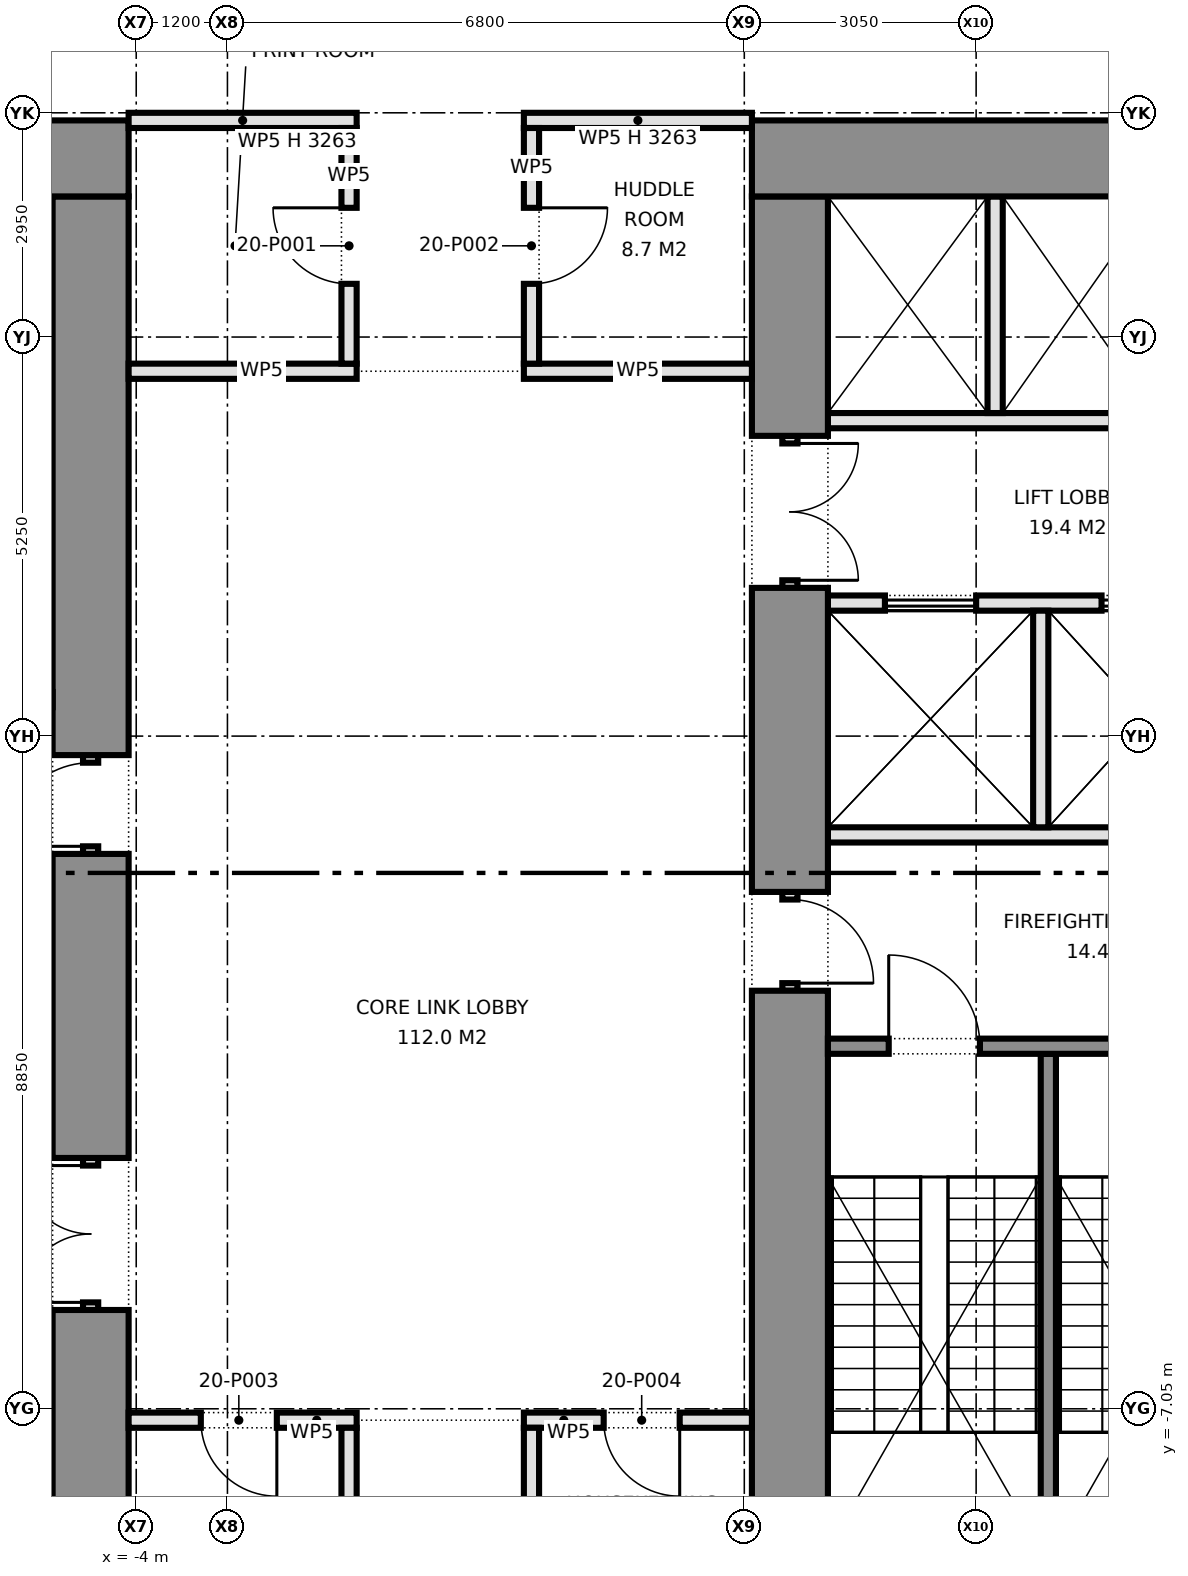
"""IFC4 building model, lengths in metres.
Left out: names, types, materials, properties, quantities, classifications, styles, units other than length and angle.
Written with IfcOpenShell. Run it as: python <this file> out.ifc"""

import sys

from ifc_helpers import new_model, si_unit, direction, frame, frame_2d, origin, place, context, subcontext, project, spatial, rectangle, extrude, element, fill, save


model = new_model("IFC4")
c1 = context("Model", 3, precision=1e-05, world=origin(), true_north=direction((0.0, 1.0)))
c2 = subcontext(c1, "Body", "Model", "MODEL_VIEW")
j1 = project(units=[si_unit("LENGTHUNIT", "METRE"), si_unit("PLANEANGLEUNIT", "RADIAN")], contexts=[c1])
p1 = place(None, origin())
s1 = spatial("IfcSite", under=j1, at=p1, CompositionType="ELEMENT")
p2 = place(p1, origin())
s2 = spatial("IfcBuilding", under=s1, at=p2, CompositionType="ELEMENT")
p3 = place(p2, frame((0.0, 0.0, 90.8)))
s3 = spatial("IfcBuildingStorey", under=s2, at=p3, CompositionType="ELEMENT", Elevation=90.8)
p4 = place(p3, frame((-14.9, 9.4, 0.0), z_axis=(0.0, 0.0, 1.0), x_axis=(1.0, 0.0, 0.0)))
e1 = element("IfcWall", 1, at=p4, inside=s3, PredefinedType="SHEAR", context=c2, shape_type="SweptSolid", body=[
    extrude(rectangle(XDim=10.8, YDim=1.0, at=frame_2d((5.4, 0.0))), origin(), (0.0, 0.0, 1.0), 4.2),
])
p5 = place(p3, frame((-4.6, -8.9, 0.0), z_axis=(0.0, 0.0, 1.0), x_axis=(0.0, 1.0, 0.0)))
e2 = element("IfcWall", 2, at=p5, inside=s3, PredefinedType="SHEAR", context=c2, shape_type="SweptSolid", body=[
    extrude(rectangle(XDim=3.15, YDim=1.0, at=frame_2d((1.575, 0.0))), origin(), (0.0, 0.0, 1.0), 4.2),
])
p6 = place(p3, frame((-4.6, -5.75, 0.0), z_axis=(0.0, 0.0, 1.0), x_axis=(0.0, 1.0, 0.0)))
e3 = element("IfcWall", 3, at=p6, inside=s3, PredefinedType="PARTITIONING", context=c2, shape_type="SweptSolid", body=[
    extrude(rectangle(XDim=2.0, YDim=0.2, at=frame_2d((1.0, 0.0))), origin(), (0.0, 0.0, 1.0), 2.4),
])
p7 = place(p6, frame((0.1, 0.0, 0.0)))
e4 = element("IfcOpeningElement", 4, at=p7, cuts=e3, PredefinedType="OPENING", context=c2, shape_type="SweptSolid", body=[
    extrude(rectangle(XDim=1.8, YDim=2.1, at=frame_2d((0.9, 1.05))), frame((0.0, 0.11, 0.0), z_axis=(0.0, -1.0, 0.0), x_axis=(1.0, 0.0, 0.0)), (0.0, 0.0, 1.0), 0.22),
])
p8 = place(p3, frame((-4.6, -3.75, 0.0), z_axis=(0.0, 0.0, 1.0), x_axis=(0.0, 1.0, 0.0)))
e5 = element("IfcWall", 5, at=p8, inside=s3, PredefinedType="SHEAR", context=c2, shape_type="SweptSolid", body=[
    extrude(rectangle(XDim=4.0, YDim=1.0, at=frame_2d((2.0, 0.0))), origin(), (0.0, 0.0, 1.0), 4.2),
])
p9 = place(p3, frame((-4.6, 0.25, 0.0), z_axis=(0.0, 0.0, 1.0), x_axis=(0.0, 1.0, 0.0)))
e6 = element("IfcWall", 6, at=p9, inside=s3, PredefinedType="PARTITIONING", context=c2, shape_type="SweptSolid", body=[
    extrude(rectangle(XDim=1.3, YDim=0.2, at=frame_2d((0.65, 0.0))), origin(), (0.0, 0.0, 1.0), 2.4),
])
p10 = place(p9, frame((0.1, 0.0, 0.0)))
e7 = element("IfcOpeningElement", 7, at=p10, cuts=e6, PredefinedType="OPENING", context=c2, shape_type="SweptSolid", body=[
    extrude(rectangle(XDim=1.1, YDim=2.1, at=frame_2d((0.55, 1.05))), frame((0.0, 0.11, 0.0), z_axis=(0.0, -1.0, 0.0), x_axis=(1.0, 0.0, 0.0)), (0.0, 0.0, 1.0), 0.22),
])
p11 = place(p3, frame((-4.6, 1.55, 0.0), z_axis=(0.0, 0.0, 1.0), x_axis=(0.0, 1.0, 0.0)))
e8 = element("IfcWall", 8, at=p11, inside=s3, PredefinedType="SHEAR", context=c2, shape_type="SweptSolid", body=[
    extrude(rectangle(XDim=7.35, YDim=1.0, at=frame_2d((3.675, 0.0))), origin(), (0.0, 0.0, 1.0), 4.2),
])
p12 = place(p3, frame((14.9, 9.4, 0.0), z_axis=(0.0, 0.0, 1.0), x_axis=(-1.0, 0.0, 0.0)))
e9 = element("IfcWall", 9, at=p12, inside=s3, PredefinedType="SHEAR", context=c2, shape_type="SweptSolid", body=[
    extrude(rectangle(XDim=10.8, YDim=1.0, at=frame_2d((5.4, 0.0))), origin(), (0.0, 0.0, 1.0), 4.2),
])
p13 = place(p3, frame((4.6, 8.9, 0.0), z_axis=(0.0, 0.0, 1.0), x_axis=(0.0, -1.0, 0.0)))
e10 = element("IfcWall", 10, at=p13, inside=s3, PredefinedType="SHEAR", context=c2, shape_type="SweptSolid", body=[
    extrude(rectangle(XDim=3.15, YDim=1.0, at=frame_2d((1.575, 0.0))), origin(), (0.0, 0.0, 1.0), 4.2),
])
p14 = place(p3, frame((4.6, 5.75, 0.0), z_axis=(0.0, 0.0, 1.0), x_axis=(0.0, -1.0, 0.0)))
e11 = element("IfcWall", 11, at=p14, inside=s3, PredefinedType="PARTITIONING", context=c2, shape_type="SweptSolid", body=[
    extrude(rectangle(XDim=2.0, YDim=0.2, at=frame_2d((1.0, 0.0))), origin(), (0.0, 0.0, 1.0), 2.4),
])
p15 = place(p14, frame((0.1, 0.0, 0.0)))
e12 = element("IfcOpeningElement", 12, at=p15, cuts=e11, PredefinedType="OPENING", context=c2, shape_type="SweptSolid", body=[
    extrude(rectangle(XDim=1.8, YDim=2.1, at=frame_2d((0.9, 1.05))), frame((0.0, 0.11, 0.0), z_axis=(0.0, -1.0, 0.0), x_axis=(1.0, 0.0, 0.0)), (0.0, 0.0, 1.0), 0.22),
])
p16 = place(p3, frame((4.6, 3.75, 0.0), z_axis=(0.0, 0.0, 1.0), x_axis=(0.0, -1.0, 0.0)))
e13 = element("IfcWall", 13, at=p16, inside=s3, PredefinedType="SHEAR", context=c2, shape_type="SweptSolid", body=[
    extrude(rectangle(XDim=4.0, YDim=1.0, at=frame_2d((2.0, 0.0))), origin(), (0.0, 0.0, 1.0), 4.2),
])
p17 = place(p3, frame((4.6, -0.25, 0.0), z_axis=(0.0, 0.0, 1.0), x_axis=(0.0, -1.0, 0.0)))
e14 = element("IfcWall", 14, at=p17, inside=s3, PredefinedType="PARTITIONING", context=c2, shape_type="SweptSolid", body=[
    extrude(rectangle(XDim=1.3, YDim=0.2, at=frame_2d((0.65, 0.0))), origin(), (0.0, 0.0, 1.0), 2.4),
])
p18 = place(p17, frame((0.1, 0.0, 0.0)))
e15 = element("IfcOpeningElement", 15, at=p18, cuts=e14, PredefinedType="OPENING", context=c2, shape_type="SweptSolid", body=[
    extrude(rectangle(XDim=1.1, YDim=2.1, at=frame_2d((0.55, 1.05))), frame((0.0, 0.11, 0.0), z_axis=(0.0, -1.0, 0.0), x_axis=(1.0, 0.0, 0.0)), (0.0, 0.0, 1.0), 0.22),
])
p19 = place(p3, frame((4.6, -1.55, 0.0), z_axis=(0.0, 0.0, 1.0), x_axis=(0.0, -1.0, 0.0)))
e16 = element("IfcWall", 16, at=p19, inside=s3, PredefinedType="SHEAR", context=c2, shape_type="SweptSolid", body=[
    extrude(rectangle(XDim=7.35, YDim=1.0, at=frame_2d((3.675, 0.0))), origin(), (0.0, 0.0, 1.0), 4.2),
])
p20 = place(p3, frame((13.9, 5.95, 0.0), z_axis=(0.0, 0.0, 1.0), x_axis=(-1.0, 0.0, 0.0)))
e17 = element("IfcWall", 17, at=p20, inside=s3, PredefinedType="PARTITIONING", context=c2, shape_type="SweptSolid", body=[
    extrude(rectangle(XDim=8.8, YDim=0.2, at=frame_2d((4.4, 0.0))), origin(), (0.0, 0.0, 1.0), 4.2),
])
p21 = place(p20, frame((1.7, 0.0, 0.0)))
e18 = element("IfcOpeningElement", 18, at=p21, cuts=e17, PredefinedType="OPENING", context=c2, shape_type="SweptSolid", body=[
    extrude(rectangle(XDim=0.9, YDim=2.1, at=frame_2d((0.45, 1.05))), frame((0.0, 0.11, 0.0), z_axis=(0.0, -1.0, 0.0), x_axis=(1.0, 0.0, 0.0)), (0.0, 0.0, 1.0), 0.22),
])
p22 = place(p3, frame((13.9, 3.55, 0.0), z_axis=(0.0, 0.0, 1.0), x_axis=(-1.0, 0.0, 0.0)))
e19 = element("IfcWall", 19, at=p22, inside=s3, PredefinedType="PARTITIONING", context=c2, shape_type="SweptSolid", body=[
    extrude(rectangle(XDim=8.8, YDim=0.2, at=frame_2d((4.4, 0.0))), origin(), (0.0, 0.0, 1.0), 4.2),
])
p23 = place(p22, frame((0.65, 0.0, 0.0)))
e20 = element("IfcOpeningElement", 20, at=p23, cuts=e19, PredefinedType="OPENING", context=c2, shape_type="SweptSolid", body=[
    extrude(rectangle(XDim=1.8, YDim=2.1, at=frame_2d((0.9, 1.05))), frame((0.0, 0.11, 0.0), z_axis=(0.0, -1.0, 0.0), x_axis=(1.0, 0.0, 0.0)), (0.0, 0.0, 1.0), 0.22),
])
p24 = place(p22, frame((4.0, 0.0, 0.0)))
e21 = element("IfcOpeningElement", 21, at=p24, cuts=e19, PredefinedType="OPENING", context=c2, shape_type="SweptSolid", body=[
    extrude(rectangle(XDim=1.2, YDim=2.1, at=frame_2d((0.6, 1.05))), frame((0.0, 0.11, 0.0), z_axis=(0.0, -1.0, 0.0), x_axis=(1.0, 0.0, 0.0)), (0.0, 0.0, 1.0), 0.22),
])
p25 = place(p22, frame((6.85, 0.0, 0.0)))
e22 = element("IfcOpeningElement", 22, at=p25, cuts=e19, PredefinedType="OPENING", context=c2, shape_type="SweptSolid", body=[
    extrude(rectangle(XDim=1.2, YDim=2.1, at=frame_2d((0.6, 1.05))), frame((0.0, 0.11, 0.0), z_axis=(0.0, -1.0, 0.0), x_axis=(1.0, 0.0, 0.0)), (0.0, 0.0, 1.0), 0.22),
])
p26 = place(p3, frame((13.9, 0.5, 0.0), z_axis=(0.0, 0.0, 1.0), x_axis=(-1.0, 0.0, 0.0)))
e23 = element("IfcWall", 23, at=p26, inside=s3, PredefinedType="PARTITIONING", context=c2, shape_type="SweptSolid", body=[
    extrude(rectangle(XDim=8.8, YDim=0.2, at=frame_2d((4.4, 0.0))), origin(), (0.0, 0.0, 1.0), 4.2),
])
p27 = place(p3, frame((13.9, -2.28, 0.0), z_axis=(0.0, 0.0, 1.0), x_axis=(-1.0, 0.0, 0.0)))
e24 = element("IfcWall", 24, at=p27, inside=s3, PredefinedType="SHEAR", context=c2, shape_type="SweptSolid", body=[
    extrude(rectangle(XDim=8.8, YDim=0.2, at=frame_2d((4.4, 0.0))), origin(), (0.0, 0.0, 1.0), 4.2),
])
p28 = place(p27, frame((3.8, 0.0, 0.0)))
e25 = element("IfcOpeningElement", 25, at=p28, cuts=e24, PredefinedType="OPENING", context=c2, shape_type="SweptSolid", body=[
    extrude(rectangle(XDim=1.2, YDim=2.1, at=frame_2d((0.6, 1.05))), frame((0.0, 0.11, 0.0), z_axis=(0.0, -1.0, 0.0), x_axis=(1.0, 0.0, 0.0)), (0.0, 0.0, 1.0), 0.22),
])
p29 = place(p27, frame((6.8, 0.0, 0.0)))
e26 = element("IfcOpeningElement", 26, at=p29, cuts=e24, PredefinedType="OPENING", context=c2, shape_type="SweptSolid", body=[
    extrude(rectangle(XDim=1.2, YDim=2.1, at=frame_2d((0.6, 1.05))), frame((0.0, 0.11, 0.0), z_axis=(0.0, -1.0, 0.0), x_axis=(1.0, 0.0, 0.0)), (0.0, 0.0, 1.0), 0.22),
])
p30 = place(p3, frame((8.0, -2.38, 0.0), z_axis=(0.0, 0.0, 1.0), x_axis=(0.0, -1.0, 0.0)))
e27 = element("IfcWall", 27, at=p30, inside=s3, PredefinedType="SHEAR", context=c2, shape_type="SweptSolid", body=[
    extrude(rectangle(XDim=6.52, YDim=0.2, at=frame_2d((3.26, 0.0))), origin(), (0.0, 0.0, 1.0), 4.2),
])
for number, where, z_axis, x_axis in (
    (28, (7.3, 8.9, 0.0), (0.0, 0.0, 1.0), (0.0, -1.0, 0.0)),
    (29, (7.9, 3.45, 0.0), (0.0, 0.0, 1.0), (0.0, -1.0, 0.0)),
):
    element("IfcWall", number, at=place(p3, frame(where, z_axis=z_axis, x_axis=x_axis)), inside=s3, PredefinedType="PARTITIONING", context=c2, shape_type="SweptSolid", body=[
        extrude(rectangle(XDim=2.85, YDim=0.2, at=frame_2d((1.425, 0.0))), origin(), (0.0, 0.0, 1.0), 4.2),
    ])
p31 = place(p3, frame((-4.1, -7.2, 0.0), z_axis=(0.0, 0.0, 1.0), x_axis=(1.0, 0.0, 0.0)))
e30 = element("IfcWall", 30, at=p31, inside=s3, PredefinedType="PARTITIONING", context=c2, shape_type="SweptSolid", body=[
    extrude(rectangle(XDim=3.0, YDim=0.2, at=frame_2d((1.5, 0.0))), origin(), (0.0, 0.0, 1.0), 4.2),
])
p32 = place(p31, frame((0.95, 0.0, 0.0)))
e31 = element("IfcOpeningElement", 31, at=p32, cuts=e30, PredefinedType="OPENING", context=c2, shape_type="SweptSolid", body=[
    extrude(rectangle(XDim=1.0, YDim=2.1, at=frame_2d((0.5, 1.05))), frame((0.0, 0.11, 0.0), z_axis=(0.0, -1.0, 0.0), x_axis=(1.0, 0.0, 0.0)), (0.0, 0.0, 1.0), 0.22),
])
p33 = place(p3, frame((1.1, -7.2, 0.0), z_axis=(0.0, 0.0, 1.0), x_axis=(1.0, 0.0, 0.0)))
e32 = element("IfcWall", 32, at=p33, inside=s3, PredefinedType="PARTITIONING", context=c2, shape_type="SweptSolid", body=[
    extrude(rectangle(XDim=3.0, YDim=0.2, at=frame_2d((1.5, 0.0))), origin(), (0.0, 0.0, 1.0), 4.2),
])
p34 = place(p33, frame((1.05, 0.0, 0.0)))
e33 = element("IfcOpeningElement", 33, at=p34, cuts=e32, PredefinedType="OPENING", context=c2, shape_type="SweptSolid", body=[
    extrude(rectangle(XDim=1.0, YDim=2.1, at=frame_2d((0.5, 1.05))), frame((0.0, 0.11, 0.0), z_axis=(0.0, -1.0, 0.0), x_axis=(1.0, 0.0, 0.0)), (0.0, 0.0, 1.0), 0.22),
])
for number, where, z_axis, x_axis in (
    (34, (-4.1, 6.6, 0.0), (0.0, 0.0, 1.0), (1.0, 0.0, 0.0)),
    (35, (1.1, 6.6, 0.0), (0.0, 0.0, 1.0), (1.0, 0.0, 0.0)),
):
    element("IfcWall", number, at=place(p3, frame(where, z_axis=z_axis, x_axis=x_axis)), inside=s3, PredefinedType="PARTITIONING", context=c2, shape_type="SweptSolid", body=[
        extrude(rectangle(XDim=3.0, YDim=0.2, at=frame_2d((1.5, 0.0))), origin(), (0.0, 0.0, 1.0), 4.2),
    ])
for number, where, z_axis, x_axis in (
    (36, (-4.1, 9.9, 0.0), (0.0, 0.0, 1.0), (1.0, 0.0, 0.0)),
    (37, (1.1, 9.9, 0.0), (0.0, 0.0, 1.0), (1.0, 0.0, 0.0)),
):
    element("IfcWall", number, at=place(p3, frame(where, z_axis=z_axis, x_axis=x_axis)), inside=s3, PredefinedType="PARTITIONING", context=c2, shape_type="SweptSolid", body=[
        extrude(rectangle(XDim=3.0, YDim=0.2, at=frame_2d((1.5, 0.0))), origin(), (0.0, 0.0, 1.0), 3.263),
    ])
p35 = place(p3, frame((1.2, -9.8, 0.0), z_axis=(0.0, 0.0, 1.0), x_axis=(0.0, 1.0, 0.0)))
e38 = element("IfcWall", 38, at=p35, inside=s3, PredefinedType="PARTITIONING", context=c2, shape_type="SweptSolid", body=[
    extrude(rectangle(XDim=2.5, YDim=0.2, at=frame_2d((1.25, 0.0))), origin(), (0.0, 0.0, 1.0), 4.2),
])
p36 = place(p3, frame((1.2, 6.7, 0.0), z_axis=(0.0, 0.0, 1.0), x_axis=(0.0, 1.0, 0.0)))
e39 = element("IfcWall", 39, at=p36, inside=s3, PredefinedType="PARTITIONING", context=c2, shape_type="SweptSolid", body=[
    extrude(rectangle(XDim=3.1, YDim=0.2, at=frame_2d((1.55, 0.0))), origin(), (0.0, 0.0, 1.0), 4.2),
])
p37 = place(p36, frame((1.05, 0.0, 0.0)))
e40 = element("IfcOpeningElement", 40, at=p37, cuts=e39, PredefinedType="OPENING", context=c2, shape_type="SweptSolid", body=[
    extrude(rectangle(XDim=1.0, YDim=2.1, at=frame_2d((0.5, 1.05))), frame((0.0, 0.11, 0.0), z_axis=(0.0, -1.0, 0.0), x_axis=(1.0, 0.0, 0.0)), (0.0, 0.0, 1.0), 0.22),
])
p38 = place(p3, frame((-1.2, -9.8, 0.0), z_axis=(0.0, 0.0, 1.0), x_axis=(0.0, 1.0, 0.0)))
e41 = element("IfcWall", 41, at=p38, inside=s3, PredefinedType="PARTITIONING", context=c2, shape_type="SweptSolid", body=[
    extrude(rectangle(XDim=2.5, YDim=0.2, at=frame_2d((1.25, 0.0))), origin(), (0.0, 0.0, 1.0), 4.2),
])
p39 = place(p3, frame((-1.2, 6.7, 0.0), z_axis=(0.0, 0.0, 1.0), x_axis=(0.0, 1.0, 0.0)))
e42 = element("IfcWall", 42, at=p39, inside=s3, PredefinedType="PARTITIONING", context=c2, shape_type="SweptSolid", body=[
    extrude(rectangle(XDim=3.1, YDim=0.2, at=frame_2d((1.55, 0.0))), origin(), (0.0, 0.0, 1.0), 4.2),
])
p40 = place(p39, frame((1.05, 0.0, 0.0)))
e43 = element("IfcOpeningElement", 43, at=p40, cuts=e42, PredefinedType="OPENING", context=c2, shape_type="SweptSolid", body=[
    extrude(rectangle(XDim=1.0, YDim=2.1, at=frame_2d((0.5, 1.05))), frame((0.0, 0.11, 0.0), z_axis=(0.0, -1.0, 0.0), x_axis=(1.0, 0.0, 0.0)), (0.0, 0.0, 1.0), 0.22),
])
p41 = place(p7, origin())
e44 = element("IfcDoor", 44, at=p41, inside=s3, OperationType="DOUBLE_DOOR_SINGLE_SWING", PredefinedType="DOOR", context=c2, shape_type="SweptSolid", body=[
    extrude(rectangle(XDim=1.8, YDim=2.1, at=frame_2d((0.9, 1.05))), frame((0.0, 0.025, 0.0), z_axis=(0.0, -1.0, 0.0), x_axis=(1.0, 0.0, 0.0)), (0.0, 0.0, 1.0), 0.05),
])
fill(e4, e44)
p42 = place(p10, origin())
e45 = element("IfcDoor", 45, at=p42, inside=s3, OperationType="SINGLE_SWING_LEFT", PredefinedType="DOOR", context=c2, shape_type="SweptSolid", body=[
    extrude(rectangle(XDim=1.1, YDim=2.1, at=frame_2d((0.55, 1.05))), frame((0.0, 0.025, 0.0), z_axis=(0.0, -1.0, 0.0), x_axis=(1.0, 0.0, 0.0)), (0.0, 0.0, 1.0), 0.05),
])
fill(e7, e45)
p43 = place(p15, origin())
e46 = element("IfcDoor", 46, at=p43, inside=s3, OperationType="DOUBLE_DOOR_SINGLE_SWING", PredefinedType="DOOR", context=c2, shape_type="SweptSolid", body=[
    extrude(rectangle(XDim=1.8, YDim=2.1, at=frame_2d((0.9, 1.05))), frame((0.0, 0.025, 0.0), z_axis=(0.0, -1.0, 0.0), x_axis=(1.0, 0.0, 0.0)), (0.0, 0.0, 1.0), 0.05),
])
fill(e12, e46)
p44 = place(p18, origin())
e47 = element("IfcDoor", 47, at=p44, inside=s3, OperationType="SINGLE_SWING_RIGHT", PredefinedType="DOOR", context=c2, shape_type="SweptSolid", body=[
    extrude(rectangle(XDim=1.1, YDim=2.1, at=frame_2d((0.55, 1.05))), frame((0.0, 0.025, 0.0), z_axis=(0.0, -1.0, 0.0), x_axis=(1.0, 0.0, 0.0)), (0.0, 0.0, 1.0), 0.05),
])
fill(e15, e47)
p45 = place(p24, origin())
e48 = element("IfcDoor", 48, at=p45, inside=s3, OperationType="DOUBLE_DOOR_SLIDING", PredefinedType="DOOR", context=c2, shape_type="SweptSolid", body=[
    extrude(rectangle(XDim=1.2, YDim=2.1, at=frame_2d((0.6, 1.05))), frame((0.0, 0.025, 0.0), z_axis=(0.0, -1.0, 0.0), x_axis=(1.0, 0.0, 0.0)), (0.0, 0.0, 1.0), 0.05),
])
fill(e21, e48)
p46 = place(p25, origin())
e49 = element("IfcDoor", 49, at=p46, inside=s3, OperationType="DOUBLE_DOOR_SLIDING", PredefinedType="DOOR", context=c2, shape_type="SweptSolid", body=[
    extrude(rectangle(XDim=1.2, YDim=2.1, at=frame_2d((0.6, 1.05))), frame((0.0, 0.025, 0.0), z_axis=(0.0, -1.0, 0.0), x_axis=(1.0, 0.0, 0.0)), (0.0, 0.0, 1.0), 0.05),
])
fill(e22, e49)
p47 = place(p29, frame((1.2, 0.0, 0.0), z_axis=(0.0, 0.0, 1.0), x_axis=(-1.0, 0.0, 0.0)))
e50 = element("IfcDoor", 50, at=p47, inside=s3, OperationType="SINGLE_SWING_LEFT", PredefinedType="DOOR", context=c2, shape_type="SweptSolid", body=[
    extrude(rectangle(XDim=1.2, YDim=2.1, at=frame_2d((0.6, 1.05))), frame((0.0, 0.025, 0.0), z_axis=(0.0, -1.0, 0.0), x_axis=(1.0, 0.0, 0.0)), (0.0, 0.0, 1.0), 0.05),
])
fill(e26, e50)
p48 = place(p40, origin())
e51 = element("IfcDoor", 51, at=p48, inside=s3, OperationType="SINGLE_SWING_RIGHT", PredefinedType="DOOR", context=c2, shape_type="SweptSolid", body=[
    extrude(rectangle(XDim=1.0, YDim=2.1, at=frame_2d((0.5, 1.05))), frame((0.0, 0.025, 0.0), z_axis=(0.0, -1.0, 0.0), x_axis=(1.0, 0.0, 0.0)), (0.0, 0.0, 1.0), 0.05),
])
fill(e43, e51)
p49 = place(p37, frame((1.0, 0.0, 0.0), z_axis=(0.0, 0.0, 1.0), x_axis=(-1.0, 0.0, 0.0)))
e52 = element("IfcDoor", 52, at=p49, inside=s3, OperationType="SINGLE_SWING_LEFT", PredefinedType="DOOR", context=c2, shape_type="SweptSolid", body=[
    extrude(rectangle(XDim=1.0, YDim=2.1, at=frame_2d((0.5, 1.05))), frame((0.0, 0.025, 0.0), z_axis=(0.0, -1.0, 0.0), x_axis=(1.0, 0.0, 0.0)), (0.0, 0.0, 1.0), 0.05),
])
fill(e40, e52)
p50 = place(p32, frame((1.0, 0.0, 0.0), z_axis=(0.0, 0.0, 1.0), x_axis=(-1.0, 0.0, 0.0)))
e53 = element("IfcDoor", 53, at=p50, inside=s3, OperationType="SINGLE_SWING_LEFT", PredefinedType="DOOR", context=c2, shape_type="SweptSolid", body=[
    extrude(rectangle(XDim=1.0, YDim=2.1, at=frame_2d((0.5, 1.05))), frame((0.0, 0.025, 0.0), z_axis=(0.0, -1.0, 0.0), x_axis=(1.0, 0.0, 0.0)), (0.0, 0.0, 1.0), 0.05),
])
fill(e31, e53)
p51 = place(p34, frame((1.0, 0.0, 0.0), z_axis=(0.0, 0.0, 1.0), x_axis=(-1.0, 0.0, 0.0)))
e54 = element("IfcDoor", 54, at=p51, inside=s3, OperationType="SINGLE_SWING_LEFT", PredefinedType="DOOR", context=c2, shape_type="SweptSolid", body=[
    extrude(rectangle(XDim=1.0, YDim=2.1, at=frame_2d((0.5, 1.05))), frame((0.0, 0.025, 0.0), z_axis=(0.0, -1.0, 0.0), x_axis=(1.0, 0.0, 0.0)), (0.0, 0.0, 1.0), 0.05),
])
fill(e33, e54)
save(model, sys.argv[1])
